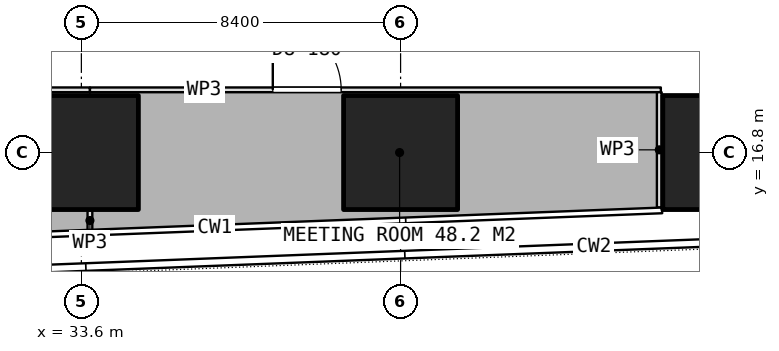
"""IFC4 building model, lengths in metres.
Left out: names, types, materials, properties, quantities, classifications, styles, units other than length and angle.
Written with IfcOpenShell. Run it as: python <this file> out.ifc"""

import sys

from ifc_helpers import new_model, si_unit, direction, frame, frame_2d, origin, origin_2d, place, context, subcontext, project, spatial, rectangle, extrude, element, fill, save


model = new_model("IFC4")
c1 = context("Model", 3, precision=1e-05, world=origin(), true_north=direction((0.0, 1.0)))
c2 = subcontext(c1, "Body", "Model", "MODEL_VIEW")
j1 = project(units=[si_unit("LENGTHUNIT", "METRE"), si_unit("PLANEANGLEUNIT", "RADIAN")], contexts=[c1])
p1 = place(None, origin())
s1 = spatial("IfcSite", under=j1, at=p1, CompositionType="ELEMENT")
p2 = place(p1, origin())
s2 = spatial("IfcBuilding", under=s1, at=p2, CompositionType="ELEMENT")
p3 = place(p2, frame((0.0, 0.0, 159.05)))
s3 = spatial("IfcBuildingStorey", under=s2, at=p3, CompositionType="ELEMENT", Elevation=159.05)
for number, where, z_axis, x_axis in (
    (1, (33.6, 16.8, 0.0), (0.0, 0.0, 1.0), (1.0, 0.0, 0.0)),
    (2, (42.0, 16.8, 0.0), (0.0, 0.0, 1.0), (1.0, 0.0, 0.0)),
    (3, (50.4, 16.8, 0.0), (0.0, 0.0, 1.0), (1.0, 0.0, 0.0)),
):
    element("IfcColumn", number, at=place(p3, frame(where, z_axis=z_axis, x_axis=x_axis)), inside=s3, PredefinedType="COLUMN", context=c2, shape_type="SweptSolid", body=[
        extrude(rectangle(XDim=3.0, YDim=3.0, at=origin_2d()), origin(), (0.0, 0.0, 1.0), 3.75),
    ])
p4 = place(p3, frame((25.202, 18.45, 0.0), z_axis=(0.0, 0.0, 1.0), x_axis=(1.0, 0.0, 0.0)))
e4 = element("IfcWall", 4, at=p4, inside=s3, PredefinedType="PARTITIONING", context=c2, shape_type="SweptSolid", body=[
    extrude(rectangle(XDim=8.623, YDim=0.125, at=frame_2d((4.312, 0.0))), origin(), (0.0, 0.0, 1.0), 3.4),
])
p5 = place(p4, frame((3.811, 0.0, 0.0)))
e5 = element("IfcOpeningElement", 5, at=p5, cuts=e4, PredefinedType="OPENING", context=c2, shape_type="SweptSolid", body=[
    extrude(rectangle(XDim=1.0, YDim=2.1, at=frame_2d((0.5, 1.05))), frame((0.0, 0.073, 0.0), z_axis=(0.0, -1.0, 0.0), x_axis=(1.0, 0.0, 0.0)), (0.0, 0.0, 1.0), 0.145),
])
p6 = place(p3, frame((33.825, 15.28, 0.0), z_axis=(0.0, 0.0, 1.0), x_axis=(0.0, -1.0, 0.0)))
e6 = element("IfcWall", 6, at=p6, inside=s3, PredefinedType="PARTITIONING", context=c2, shape_type="SweptSolid", body=[
    extrude(rectangle(XDim=0.538, YDim=0.125, at=frame_2d((0.269, 0.0))), origin(), (0.0, 0.0, 1.0), 3.4),
])
p7 = place(p3, frame((33.826, 18.45, 0.0), z_axis=(0.0, 0.0, 1.0), x_axis=(1.0, 0.0, 0.0)))
e7 = element("IfcWall", 7, at=p7, inside=s3, PredefinedType="PARTITIONING", context=c2, shape_type="SweptSolid", body=[
    extrude(rectangle(XDim=15.022, YDim=0.125, at=frame_2d((7.511, 0.0))), origin(), (0.0, 0.0, 1.0), 3.4),
])
p8 = place(p7, frame((4.811, 0.0, 0.0)))
e8 = element("IfcOpeningElement", 8, at=p8, cuts=e7, PredefinedType="OPENING", context=c2, shape_type="SweptSolid", body=[
    extrude(rectangle(XDim=1.8, YDim=2.1, at=frame_2d((0.9, 1.05))), frame((0.0, 0.073, 0.0), z_axis=(0.0, -1.0, 0.0), x_axis=(1.0, 0.0, 0.0)), (0.0, 0.0, 1.0), 0.145),
])
p9 = place(p3, frame((48.807, 18.387, 0.0), z_axis=(0.0, 0.0, 1.0), x_axis=(0.0, -1.0, 0.0)))
e9 = element("IfcWall", 9, at=p9, inside=s3, PredefinedType="PARTITIONING", context=c2, shape_type="SweptSolid", body=[
    extrude(rectangle(XDim=3.032, YDim=0.125, at=frame_2d((1.516, 0.0))), origin(), (0.0, 0.0, 1.0), 3.4),
])
p10 = place(p8, origin())
e10 = element("IfcDoor", 10, at=p10, inside=s3, OperationType="DOUBLE_DOOR_SINGLE_SWING", PredefinedType="DOOR", context=c2, shape_type="SweptSolid", body=[
    extrude(rectangle(XDim=1.8, YDim=2.1, at=frame_2d((0.9, 1.05))), frame((0.0, 0.025, 0.0), z_axis=(0.0, -1.0, 0.0), x_axis=(1.0, 0.0, 0.0)), (0.0, 0.0, 1.0), 0.05),
])
fill(e8, e10)
save(model, sys.argv[1])
